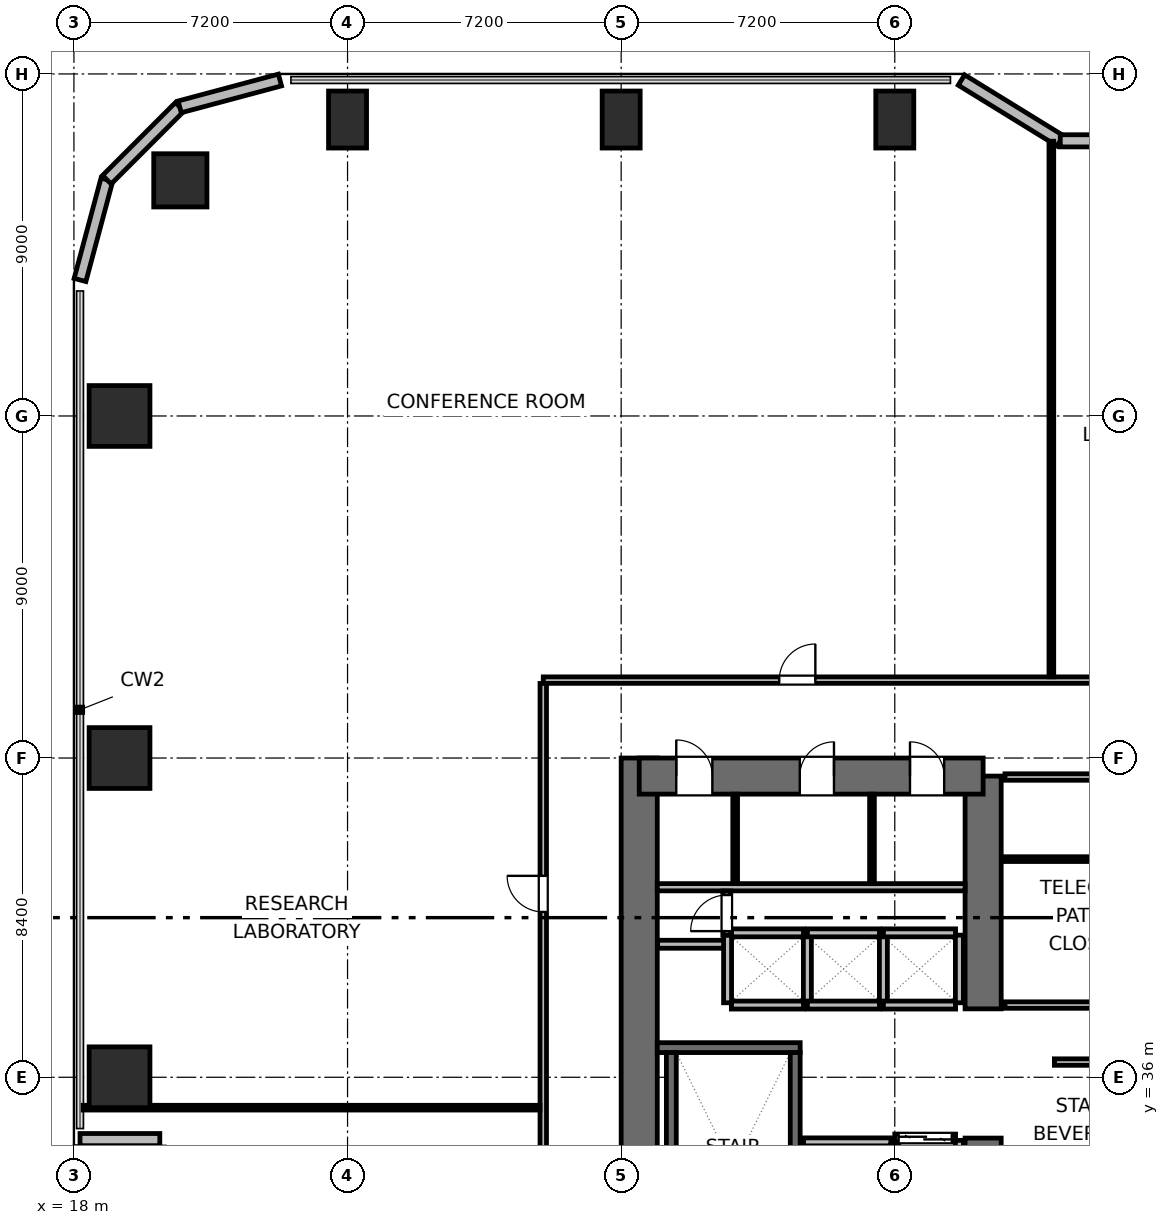
"""IFC4 building model, lengths in metres.
Left out: names, types, materials, properties, quantities, classifications, styles, units other than length and angle.
Written with IfcOpenShell. Run it as: python <this file> out.ifc"""

import sys

from ifc_helpers import new_model, si_unit, direction, frame, frame_2d, origin, origin_2d, place, context, subcontext, project, spatial, rectangle, circle, extrude, element, fill, save


model = new_model("IFC4")
c1 = context("Model", 3, precision=1e-05, world=origin(), true_north=direction((0.0, 1.0)))
c2 = subcontext(c1, "Body", "Model", "MODEL_VIEW")
j1 = project(units=[si_unit("LENGTHUNIT", "METRE"), si_unit("PLANEANGLEUNIT", "RADIAN")], contexts=[c1])
p1 = place(None, origin())
s1 = spatial("IfcSite", under=j1, at=p1, CompositionType="ELEMENT")
p2 = place(p1, origin())
s2 = spatial("IfcBuilding", under=s1, at=p2, CompositionType="ELEMENT")
p3 = place(p2, frame((0.0, 0.0, 21.6)))
s3 = spatial("IfcBuildingStorey", under=s2, at=p3, CompositionType="ELEMENT", Elevation=21.6)
p4 = place(p3, frame((32.875, 27.6, 0.0), z_axis=(0.0, 0.0, 1.0), x_axis=(0.0, 1.0, 0.0)))
e1 = element("IfcWall", 1, at=p4, inside=s3, PredefinedType="SHEAR", context=c2, shape_type="SweptSolid", body=[
    extrude(rectangle(XDim=16.8, YDim=0.95, at=frame_2d((8.4, 0.0))), origin(), (0.0, 0.0, 1.0), 3.9),
])
p5 = place(p3, frame((41.925, 28.075, 0.0), z_axis=(0.0, 0.0, 1.0), x_axis=(0.0, 1.0, 0.0)))
e2 = element("IfcWall", 2, at=p5, inside=s3, PredefinedType="SHEAR", context=c2, shape_type="SweptSolid", body=[
    extrude(rectangle(XDim=6.325, YDim=0.95, at=frame_2d((3.163, 0.0))), origin(), (0.0, 0.0, 1.0), 3.9),
])
p6 = place(p3, frame((41.925, 37.8, 0.0), z_axis=(0.0, 0.0, 1.0), x_axis=(0.0, 1.0, 0.0)))
e3 = element("IfcWall", 3, at=p6, inside=s3, PredefinedType="SHEAR", context=c2, shape_type="SweptSolid", body=[
    extrude(rectangle(XDim=6.125, YDim=0.95, at=frame_2d((3.062, 0.0))), origin(), (0.0, 0.0, 1.0), 3.9),
])
p7 = place(p3, frame((32.875, 43.925, 0.0), z_axis=(0.0, 0.0, 1.0), x_axis=(1.0, 0.0, 0.0)))
e4 = element("IfcWall", 4, at=p7, inside=s3, PredefinedType="SHEAR", context=c2, shape_type="SweptSolid", body=[
    extrude(rectangle(XDim=9.05, YDim=0.95, at=frame_2d((4.525, 0.0))), origin(), (0.0, 0.0, 1.0), 3.9),
])
p8 = place(p7, frame((0.975, 0.0, 0.0)))
e5 = element("IfcOpeningElement", 5, at=p8, cuts=e4, PredefinedType="OPENING", context=c2, shape_type="SweptSolid", body=[
    extrude(rectangle(XDim=0.95, YDim=2.04, at=frame_2d((0.475, 1.02))), frame((0.0, 0.485, 0.0), z_axis=(0.0, -1.0, 0.0), x_axis=(1.0, 0.0, 0.0)), (0.0, 0.0, 1.0), 0.97),
])
p9 = place(p7, frame((4.225, 0.0, 0.0)))
e6 = element("IfcOpeningElement", 6, at=p9, cuts=e4, PredefinedType="OPENING", context=c2, shape_type="SweptSolid", body=[
    extrude(rectangle(XDim=0.9, YDim=2.02, at=frame_2d((0.45, 1.01))), frame((0.0, 0.485, 0.0), z_axis=(0.0, -1.0, 0.0), x_axis=(1.0, 0.0, 0.0)), (0.0, 0.0, 1.0), 0.97),
])
p10 = place(p7, frame((7.125, 0.0, 0.0)))
e7 = element("IfcOpeningElement", 7, at=p10, cuts=e4, PredefinedType="OPENING", context=c2, shape_type="SweptSolid", body=[
    extrude(rectangle(XDim=0.9, YDim=2.02, at=frame_2d((0.45, 1.01))), frame((0.0, 0.485, 0.0), z_axis=(0.0, -1.0, 0.0), x_axis=(1.0, 0.0, 0.0)), (0.0, 0.0, 1.0), 0.97),
])
p11 = place(p3, frame((33.35, 36.78, 0.0), z_axis=(0.0, 0.0, 1.0), x_axis=(1.0, 0.0, 0.0)))
e8 = element("IfcWall", 8, at=p11, inside=s3, PredefinedType="SHEAR", context=c2, shape_type="SweptSolid", body=[
    extrude(rectangle(XDim=3.76, YDim=0.26, at=frame_2d((1.88, 0.0))), origin(), (0.0, 0.0, 1.0), 3.9),
])
p12 = place(p3, frame((33.72, 29.05, 0.0), z_axis=(0.0, 0.0, 1.0), x_axis=(0.0, 1.0, 0.0)))
e9 = element("IfcWall", 9, at=p12, inside=s3, PredefinedType="SHEAR", context=c2, shape_type="SweptSolid", body=[
    extrude(rectangle(XDim=7.6, YDim=0.26, at=frame_2d((3.8, 0.0))), origin(), (0.0, 0.0, 1.0), 3.9),
])
p13 = place(p3, frame((36.98, 29.05, 0.0), z_axis=(0.0, 0.0, 1.0), x_axis=(0.0, 1.0, 0.0)))
e10 = element("IfcWall", 10, at=p13, inside=s3, PredefinedType="SHEAR", context=c2, shape_type="SweptSolid", body=[
    extrude(rectangle(XDim=7.6, YDim=0.26, at=frame_2d((3.8, 0.0))), origin(), (0.0, 0.0, 1.0), 3.9),
])
p14 = place(p13, frame((0.3, 0.0, 0.0)))
e11 = element("IfcOpeningElement", 11, at=p14, cuts=e10, PredefinedType="OPENING", context=c2, shape_type="SweptSolid", body=[
    extrude(rectangle(XDim=1.0, YDim=2.04, at=frame_2d((0.5, 1.02))), frame((0.0, 0.14, 0.0), z_axis=(0.0, -1.0, 0.0), x_axis=(1.0, 0.0, 0.0)), (0.0, 0.0, 1.0), 0.28),
])
p15 = place(p3, frame((20.8, 59.6, 0.0), z_axis=(0.0, 0.0, 1.0), x_axis=(1.0, 0.0, 0.0)))
e12 = element("IfcColumn", 12, at=p15, inside=s3, PredefinedType="COLUMN", context=c2, shape_type="SweptSolid", body=[
    extrude(circle(Radius=0.7, at=origin_2d()), origin(), (0.0, 0.0, 1.0), 3.9),
])
for number, where, z_axis, x_axis in (
    (13, (25.2, 61.2, 0.0), (0.0, 0.0, 1.0), (1.0, 0.0, 0.0)),
    (14, (32.4, 61.2, 0.0), (0.0, 0.0, 1.0), (1.0, 0.0, 0.0)),
    (15, (39.6, 61.2, 0.0), (0.0, 0.0, 1.0), (1.0, 0.0, 0.0)),
):
    element("IfcColumn", number, at=place(p3, frame(where, z_axis=z_axis, x_axis=x_axis)), inside=s3, PredefinedType="COLUMN", context=c2, shape_type="SweptSolid", body=[
        extrude(rectangle(XDim=1.0, YDim=1.5, at=origin_2d()), origin(), (0.0, 0.0, 1.0), 3.9),
    ])
for number, where, z_axis, x_axis in (
    (16, (19.2, 36.0, 0.0), (0.0, 0.0, 1.0), (1.0, 0.0, 0.0)),
    (17, (19.2, 44.4, 0.0), (0.0, 0.0, 1.0), (1.0, 0.0, 0.0)),
    (18, (19.2, 53.4, 0.0), (0.0, 0.0, 1.0), (1.0, 0.0, 0.0)),
):
    element("IfcColumn", number, at=place(p3, frame(where, z_axis=z_axis, x_axis=x_axis)), inside=s3, PredefinedType="COLUMN", context=c2, shape_type="SweptSolid", body=[
        extrude(rectangle(XDim=1.6, YDim=1.6, at=origin_2d()), origin(), (0.0, 0.0, 1.0), 3.9),
    ])
p16 = place(p3, frame((20.26, 34.36, 0.0), z_axis=(0.0, 0.0, 1.0), x_axis=(-1.0, 0.0, 0.0)))
e19 = element("IfcWall", 19, at=p16, inside=s3, PredefinedType="SOLIDWALL", context=c2, shape_type="SweptSolid", body=[
    extrude(rectangle(XDim=2.1, YDim=0.32, at=frame_2d((1.05, 0.0))), origin(), (0.0, 0.0, 1.0), 2.875),
])
p17 = place(p3, frame((18.16, 56.979, 0.0), z_axis=(0.0, 0.0, 1.0), x_axis=(0.25869736047, 0.965958423373, 0.0)))
e20 = element("IfcWall", 20, at=p17, inside=s3, PredefinedType="SOLIDWALL", context=c2, shape_type="SweptSolid", body=[
    extrude(rectangle(XDim=2.731, YDim=0.32, at=frame_2d((1.366, 0.0))), origin(), (0.0, 0.0, 1.0), 3.64),
])
p18 = place(p3, frame((18.866, 59.617, 0.0), z_axis=(0.0, 0.0, 1.0), x_axis=(0.707106781187, 0.707106781187, 0.0)))
e21 = element("IfcWall", 21, at=p18, inside=s3, PredefinedType="SOLIDWALL", context=c2, shape_type="SweptSolid", body=[
    extrude(rectangle(XDim=2.71, YDim=0.32, at=frame_2d((1.355, 0.0))), origin(), (0.0, 0.0, 1.0), 3.64),
])
p19 = place(p3, frame((20.783, 61.533, 0.0), z_axis=(0.0, 0.0, 1.0), x_axis=(0.965964405026, 0.25867502435, 0.0)))
e22 = element("IfcWall", 22, at=p19, inside=s3, PredefinedType="SOLIDWALL", context=c2, shape_type="SweptSolid", body=[
    extrude(rectangle(XDim=2.731, YDim=0.32, at=frame_2d((1.366, 0.0))), origin(), (0.0, 0.0, 1.0), 3.64),
])
p20 = place(p3, frame((41.355, 62.24, 0.0), z_axis=(0.0, 0.0, 1.0), x_axis=(0.851630857047, -0.524142044989, 0.0)))
e23 = element("IfcWall", 23, at=p20, inside=s3, PredefinedType="SOLIDWALL", context=c2, shape_type="SweptSolid", body=[
    extrude(rectangle(XDim=3.053, YDim=0.32, at=frame_2d((1.526, 0.0))), origin(), (0.0, 0.0, 1.0), 2.875),
])
p21 = place(p3, frame((43.955, 60.64, 0.0), z_axis=(0.0, 0.0, 1.0), x_axis=(1.0, 0.0, 0.0)))
e24 = element("IfcWall", 24, at=p21, inside=s3, PredefinedType="SOLIDWALL", context=c2, shape_type="SweptSolid", body=[
    extrude(rectangle(XDim=4.685, YDim=0.32, at=frame_2d((2.343, 0.0))), origin(), (0.0, 0.0, 1.0), 2.875),
])
p22 = place(p21, frame((1.443, 0.0, 0.85)))
e25 = element("IfcOpeningElement", 25, at=p22, cuts=e24, PredefinedType="OPENING", context=c2, shape_type="SweptSolid", body=[
    extrude(rectangle(XDim=1.8, YDim=1.1, at=frame_2d((0.9, 0.55))), frame((0.0, 0.17, 0.0), z_axis=(0.0, -1.0, 0.0), x_axis=(1.0, 0.0, 0.0)), (0.0, 0.0, 1.0), 0.34),
])
p23 = place(p3, frame((33.35, 41.0, 0.0), z_axis=(0.0, 0.0, 1.0), x_axis=(1.0, 0.0, 0.0)))
e26 = element("IfcWall", 26, at=p23, inside=s3, PredefinedType="PLUMBINGWALL", context=c2, shape_type="SweptSolid", body=[
    extrude(rectangle(XDim=8.1, YDim=0.19, at=frame_2d((4.05, 0.0))), origin(), (0.0, 0.0, 1.0), 3.64),
])
for number, where, z_axis, x_axis in (
    (27, (35.4, 41.095, 0.0), (0.0, 0.0, 1.0), (0.0, 1.0, 0.0)),
    (28, (39.0, 41.095, 0.0), (0.0, 0.0, 1.0), (0.0, 1.0, 0.0)),
):
    element("IfcWall", number, at=place(p3, frame(where, z_axis=z_axis, x_axis=x_axis)), inside=s3, PredefinedType="PARTITIONING", context=c2, shape_type="SweptSolid", body=[
        extrude(rectangle(XDim=2.355, YDim=0.125, at=frame_2d((1.177, 0.0))), origin(), (0.0, 0.0, 1.0), 3.64),
    ])
p24 = place(p3, frame((33.36, 39.5, 0.0), z_axis=(0.0, 0.0, 1.0), x_axis=(1.0, 0.0, 0.0)))
e29 = element("IfcWall", 29, at=p24, inside=s3, PredefinedType="PARTITIONING", context=c2, shape_type="SweptSolid", body=[
    extrude(rectangle(XDim=1.86, YDim=0.21, at=frame_2d((0.93, 0.0))), origin(), (0.0, 0.0, 1.0), 3.64),
])
p25 = place(p3, frame((37.2, 34.3, 0.0), z_axis=(0.0, 0.0, 1.0), x_axis=(1.0, 0.0, 0.0)))
e30 = element("IfcWall", 30, at=p25, inside=s3, PredefinedType="PARTITIONING", context=c2, shape_type="SweptSolid", body=[
    extrude(rectangle(XDim=2.3, YDim=0.21, at=frame_2d((1.15, 0.0))), origin(), (0.0, 0.0, 1.0), 3.64),
])
p26 = place(p3, frame((39.6, 31.96, 0.0), z_axis=(0.0, 0.0, 1.0), x_axis=(0.0, 1.0, 0.0)))
e31 = element("IfcWall", 31, at=p26, inside=s3, PredefinedType="PARTITIONING", context=c2, shape_type="SweptSolid", body=[
    extrude(rectangle(XDim=2.28, YDim=0.21, at=frame_2d((1.14, 0.0))), origin(), (0.0, 0.0, 1.0), 3.64),
])
p27 = place(p3, frame((39.6, 34.4, 0.0), z_axis=(0.0, 0.0, 1.0), x_axis=(1.0, 0.0, 0.0)))
e32 = element("IfcWall", 32, at=p27, inside=s3, PredefinedType="PARTITIONING", context=c2, shape_type="SweptSolid", body=[
    extrude(rectangle(XDim=1.6, YDim=0.21, at=frame_2d((0.8, 0.0))), origin(), (0.0, 0.0, 1.0), 3.64),
])
p28 = place(p27, frame((0.1, 0.0, 0.0)))
e33 = element("IfcOpeningElement", 33, at=p28, cuts=e32, PredefinedType="OPENING", context=c2, shape_type="SweptSolid", body=[
    extrude(rectangle(XDim=1.4, YDim=2.06, at=frame_2d((0.7, 1.03))), frame((0.0, 0.115, 0.0), z_axis=(0.0, -1.0, 0.0), x_axis=(1.0, 0.0, 0.0)), (0.0, 0.0, 1.0), 0.23),
])
p29 = place(p3, frame((41.3, 31.96, 0.0), z_axis=(0.0, 0.0, 1.0), x_axis=(0.0, 1.0, 0.0)))
e34 = element("IfcWall", 34, at=p29, inside=s3, PredefinedType="PARTITIONING", context=c2, shape_type="SweptSolid", body=[
    extrude(rectangle(XDim=2.38, YDim=0.21, at=frame_2d((1.19, 0.0))), origin(), (0.0, 0.0, 1.0), 3.64),
])
for number, where, z_axis, x_axis in (
    (35, (35.3, 37.9, 0.0), (0.0, 0.0, 1.0), (1.0, 0.0, 0.0)),
    (36, (35.3, 39.8, 0.0), (0.0, 0.0, 1.0), (1.0, 0.0, 0.0)),
):
    element("IfcWall", number, at=place(p3, frame(where, z_axis=z_axis, x_axis=x_axis)), inside=s3, PredefinedType="PARTITIONING", context=c2, shape_type="SweptSolid", body=[
        extrude(rectangle(XDim=1.9, YDim=0.21, at=frame_2d((0.95, 0.0))), origin(), (0.0, 0.0, 1.0), 3.64),
    ])
for number, where, z_axis, x_axis in (
    (37, (35.2, 37.96, 0.0), (0.0, 0.0, 1.0), (0.0, 1.0, 0.0)),
    (38, (37.3, 37.96, 0.0), (0.0, 0.0, 1.0), (0.0, 1.0, 0.0)),
):
    element("IfcWall", number, at=place(p3, frame(where, z_axis=z_axis, x_axis=x_axis)), inside=s3, PredefinedType="PARTITIONING", context=c2, shape_type="SweptSolid", body=[
        extrude(rectangle(XDim=1.78, YDim=0.21, at=frame_2d((0.89, 0.0))), origin(), (0.0, 0.0, 1.0), 3.64),
    ])
for number, where, z_axis, x_axis in (
    (39, (37.3, 37.9, 0.0), (0.0, 0.0, 1.0), (1.0, 0.0, 0.0)),
    (40, (37.3, 39.8, 0.0), (0.0, 0.0, 1.0), (1.0, 0.0, 0.0)),
):
    element("IfcWall", number, at=place(p3, frame(where, z_axis=z_axis, x_axis=x_axis)), inside=s3, PredefinedType="PARTITIONING", context=c2, shape_type="SweptSolid", body=[
        extrude(rectangle(XDim=1.9, YDim=0.21, at=frame_2d((0.95, 0.0))), origin(), (0.0, 0.0, 1.0), 3.64),
    ])
p30 = place(p3, frame((39.3, 37.96, 0.0), z_axis=(0.0, 0.0, 1.0), x_axis=(0.0, 1.0, 0.0)))
e41 = element("IfcWall", 41, at=p30, inside=s3, PredefinedType="PARTITIONING", context=c2, shape_type="SweptSolid", body=[
    extrude(rectangle(XDim=1.78, YDim=0.21, at=frame_2d((0.89, 0.0))), origin(), (0.0, 0.0, 1.0), 3.64),
])
for number, where, z_axis, x_axis in (
    (42, (39.3, 37.9, 0.0), (0.0, 0.0, 1.0), (1.0, 0.0, 0.0)),
    (43, (39.3, 39.8, 0.0), (0.0, 0.0, 1.0), (1.0, 0.0, 0.0)),
):
    element("IfcWall", number, at=place(p3, frame(where, z_axis=z_axis, x_axis=x_axis)), inside=s3, PredefinedType="PARTITIONING", context=c2, shape_type="SweptSolid", body=[
        extrude(rectangle(XDim=1.9, YDim=0.21, at=frame_2d((0.95, 0.0))), origin(), (0.0, 0.0, 1.0), 3.64),
    ])
p31 = place(p3, frame((41.3, 37.96, 0.0), z_axis=(0.0, 0.0, 1.0), x_axis=(0.0, 1.0, 0.0)))
e44 = element("IfcWall", 44, at=p31, inside=s3, PredefinedType="PARTITIONING", context=c2, shape_type="SweptSolid", body=[
    extrude(rectangle(XDim=1.78, YDim=0.21, at=frame_2d((0.89, 0.0))), origin(), (0.0, 0.0, 1.0), 3.64),
])
p32 = place(p3, frame((35.18, 39.74, 0.0), z_axis=(0.0, 0.0, 1.0), x_axis=(0.0, 1.0, 0.0)))
e45 = element("IfcWall", 45, at=p32, inside=s3, PredefinedType="PARTITIONING", context=c2, shape_type="SweptSolid", body=[
    extrude(rectangle(XDim=1.16, YDim=0.21, at=frame_2d((0.58, 0.0))), origin(), (0.0, 0.0, 1.0), 3.64),
])
p33 = place(p32, frame((0.105, 0.0, 0.0)))
e46 = element("IfcOpeningElement", 46, at=p33, cuts=e45, PredefinedType="OPENING", context=c2, shape_type="SweptSolid", body=[
    extrude(rectangle(XDim=0.95, YDim=2.04, at=frame_2d((0.475, 1.02))), frame((0.0, 0.115, 0.0), z_axis=(0.0, -1.0, 0.0), x_axis=(1.0, 0.0, 0.0)), (0.0, 0.0, 1.0), 0.23),
])
p34 = place(p3, frame((43.8, 36.4, 0.0), z_axis=(0.0, 0.0, 1.0), x_axis=(1.0, 0.0, 0.0)))
e47 = element("IfcWall", 47, at=p34, inside=s3, PredefinedType="PARTITIONING", context=c2, shape_type="SweptSolid", body=[
    extrude(rectangle(XDim=2.913, YDim=0.17, at=frame_2d((1.457, 0.0))), origin(), (0.0, 0.0, 1.0), 3.64),
])
p35 = place(p3, frame((42.5, 37.9, 0.0), z_axis=(0.0, 0.0, 1.0), x_axis=(1.0, 0.0, 0.0)))
e48 = element("IfcWall", 48, at=p35, inside=s3, PredefinedType="PARTITIONING", context=c2, shape_type="SweptSolid", body=[
    extrude(rectangle(XDim=4.213, YDim=0.17, at=frame_2d((2.106, 0.0))), origin(), (0.0, 0.0, 1.0), 3.64),
])
p36 = place(p3, frame((42.5, 43.9, 0.0), z_axis=(0.0, 0.0, 1.0), x_axis=(1.0, 0.0, 0.0)))
e49 = element("IfcWall", 49, at=p36, inside=s3, PredefinedType="PARTITIONING", context=c2, shape_type="SweptSolid", body=[
    extrude(rectangle(XDim=4.213, YDim=0.17, at=frame_2d((2.106, 0.0))), origin(), (0.0, 0.0, 1.0), 2.525),
])
p37 = place(p3, frame((42.5, 41.74, 0.0), z_axis=(0.0, 0.0, 1.0), x_axis=(1.0, 0.0, 0.0)))
e50 = element("IfcWall", 50, at=p37, inside=s3, PredefinedType="PARTITIONING", context=c2, shape_type="SweptSolid", body=[
    extrude(rectangle(XDim=4.213, YDim=0.125, at=frame_2d((2.106, 0.0))), origin(), (0.0, 0.0, 1.0), 3.64),
])
p38 = place(p3, frame((30.35, 46.45, 0.0), z_axis=(0.0, 0.0, 1.0), x_axis=(1.0, 0.0, 0.0)))
e51 = element("IfcWall", 51, at=p38, inside=s3, PredefinedType="PARTITIONING", context=c2, shape_type="SweptSolid", body=[
    extrude(rectangle(XDim=35.3, YDim=0.17, at=frame_2d((17.65, 0.0))), origin(), (0.0, 0.0, 1.0), 3.64),
])
p39 = place(p38, frame((6.21, 0.0, 0.0)))
e52 = element("IfcOpeningElement", 52, at=p39, cuts=e51, PredefinedType="OPENING", context=c2, shape_type="SweptSolid", body=[
    extrude(rectangle(XDim=0.95, YDim=2.04, at=frame_2d((0.475, 1.02))), frame((0.0, 0.095, 0.0), z_axis=(0.0, -1.0, 0.0), x_axis=(1.0, 0.0, 0.0)), (0.0, 0.0, 1.0), 0.19),
])
p40 = place(p38, frame((15.38, 0.0, 0.0)))
e53 = element("IfcOpeningElement", 53, at=p40, cuts=e51, PredefinedType="OPENING", context=c2, shape_type="SweptSolid", body=[
    extrude(rectangle(XDim=0.95, YDim=2.04, at=frame_2d((0.475, 1.02))), frame((0.0, 0.095, 0.0), z_axis=(0.0, -1.0, 0.0), x_axis=(1.0, 0.0, 0.0)), (0.0, 0.0, 1.0), 0.19),
])
p41 = place(p38, frame((26.345, 0.0, 0.0)))
e54 = element("IfcOpeningElement", 54, at=p41, cuts=e51, PredefinedType="OPENING", context=c2, shape_type="SweptSolid", body=[
    extrude(rectangle(XDim=0.95, YDim=2.04, at=frame_2d((0.475, 1.02))), frame((0.0, 0.095, 0.0), z_axis=(0.0, -1.0, 0.0), x_axis=(1.0, 0.0, 0.0)), (0.0, 0.0, 1.0), 0.19),
])
p42 = place(p3, frame((30.35, 25.637, 0.0), z_axis=(0.0, 0.0, 1.0), x_axis=(0.0, 1.0, 0.0)))
e55 = element("IfcWall", 55, at=p42, inside=s3, PredefinedType="PARTITIONING", context=c2, shape_type="SweptSolid", body=[
    extrude(rectangle(XDim=20.726, YDim=0.17, at=frame_2d((10.363, 0.0))), origin(), (0.0, 0.0, 1.0), 3.64),
])
p43 = place(p42, frame((4.263, 0.0, 0.0)))
e56 = element("IfcOpeningElement", 56, at=p43, cuts=e55, PredefinedType="OPENING", context=c2, shape_type="SweptSolid", body=[
    extrude(rectangle(XDim=0.95, YDim=2.04, at=frame_2d((0.475, 1.02))), frame((0.0, 0.095, 0.0), z_axis=(0.0, -1.0, 0.0), x_axis=(1.0, 0.0, 0.0)), (0.0, 0.0, 1.0), 0.19),
])
p44 = place(p42, frame((14.713, 0.0, 0.0)))
e57 = element("IfcOpeningElement", 57, at=p44, cuts=e55, PredefinedType="OPENING", context=c2, shape_type="SweptSolid", body=[
    extrude(rectangle(XDim=0.95, YDim=2.04, at=frame_2d((0.475, 1.02))), frame((0.0, 0.095, 0.0), z_axis=(0.0, -1.0, 0.0), x_axis=(1.0, 0.0, 0.0)), (0.0, 0.0, 1.0), 0.19),
])
p45 = place(p3, frame((43.72, 46.537, 0.0), z_axis=(0.0, 0.0, 1.0), x_axis=(0.0, 1.0, 0.0)))
e58 = element("IfcWall", 58, at=p45, inside=s3, PredefinedType="PARTITIONING", context=c2, shape_type="SweptSolid", body=[
    extrude(rectangle(XDim=14.093, YDim=0.125, at=frame_2d((7.046, 0.0))), origin(), (0.0, 0.0, 1.0), 3.003),
])
p46 = place(p3, frame((18.245, 35.2, 0.0), z_axis=(0.0, 0.0, 1.0), x_axis=(1.0, 0.0, 0.0)))
e59 = element("IfcWall", 59, at=p46, inside=s3, PredefinedType="PARTITIONING", context=c2, shape_type="SweptSolid", body=[
    extrude(rectangle(XDim=12.018, YDim=0.125, at=frame_2d((6.009, 0.0))), origin(), (0.0, 0.0, 1.0), 3.64),
])
p47 = place(p28, origin())
e60 = element("IfcDoor", 60, at=p47, inside=s3, OperationType="DOUBLE_DOOR_SLIDING", PredefinedType="DOOR", context=c2, shape_type="SweptSolid", body=[
    extrude(rectangle(XDim=1.4, YDim=2.06, at=frame_2d((0.7, 1.03))), frame((0.0, 0.025, 0.0), z_axis=(0.0, -1.0, 0.0), x_axis=(1.0, 0.0, 0.0)), (0.0, 0.0, 1.0), 0.05),
])
fill(e33, e60)
p48 = place(p8, origin())
e61 = element("IfcDoor", 61, at=p48, inside=s3, OperationType="SINGLE_SWING_LEFT", PredefinedType="DOOR", context=c2, shape_type="SweptSolid", body=[
    extrude(rectangle(XDim=0.95, YDim=2.04, at=frame_2d((0.475, 1.02))), frame((0.0, 0.025, 0.0), z_axis=(0.0, -1.0, 0.0), x_axis=(1.0, 0.0, 0.0)), (0.0, 0.0, 1.0), 0.05),
])
fill(e5, e61)
p49 = place(p9, origin())
e62 = element("IfcDoor", 62, at=p49, inside=s3, OperationType="SINGLE_SWING_RIGHT", PredefinedType="DOOR", context=c2, shape_type="SweptSolid", body=[
    extrude(rectangle(XDim=0.9, YDim=2.02, at=frame_2d((0.45, 1.01))), frame((0.0, 0.025, 0.0), z_axis=(0.0, -1.0, 0.0), x_axis=(1.0, 0.0, 0.0)), (0.0, 0.0, 1.0), 0.05),
])
fill(e6, e62)
p50 = place(p10, origin())
e63 = element("IfcDoor", 63, at=p50, inside=s3, OperationType="SINGLE_SWING_LEFT", PredefinedType="DOOR", context=c2, shape_type="SweptSolid", body=[
    extrude(rectangle(XDim=0.9, YDim=2.02, at=frame_2d((0.45, 1.01))), frame((0.0, 0.025, 0.0), z_axis=(0.0, -1.0, 0.0), x_axis=(1.0, 0.0, 0.0)), (0.0, 0.0, 1.0), 0.05),
])
fill(e7, e63)
p51 = place(p33, origin())
e64 = element("IfcDoor", 64, at=p51, inside=s3, OperationType="SINGLE_SWING_LEFT", PredefinedType="DOOR", context=c2, shape_type="SweptSolid", body=[
    extrude(rectangle(XDim=0.95, YDim=2.04, at=frame_2d((0.475, 1.02))), frame((0.0, 0.025, 0.0), z_axis=(0.0, -1.0, 0.0), x_axis=(1.0, 0.0, 0.0)), (0.0, 0.0, 1.0), 0.05),
])
fill(e46, e64)
p52 = place(p39, origin())
e65 = element("IfcDoor", 65, at=p52, inside=s3, OperationType="SINGLE_SWING_RIGHT", PredefinedType="DOOR", context=c2, shape_type="SweptSolid", body=[
    extrude(rectangle(XDim=0.95, YDim=2.04, at=frame_2d((0.475, 1.02))), frame((0.0, 0.025, 0.0), z_axis=(0.0, -1.0, 0.0), x_axis=(1.0, 0.0, 0.0)), (0.0, 0.0, 1.0), 0.05),
])
fill(e52, e65)
p53 = place(p44, origin())
e66 = element("IfcDoor", 66, at=p53, inside=s3, OperationType="SINGLE_SWING_RIGHT", PredefinedType="DOOR", context=c2, shape_type="SweptSolid", body=[
    extrude(rectangle(XDim=0.95, YDim=2.04, at=frame_2d((0.475, 1.02))), frame((0.0, 0.025, 0.0), z_axis=(0.0, -1.0, 0.0), x_axis=(1.0, 0.0, 0.0)), (0.0, 0.0, 1.0), 0.05),
])
fill(e57, e66)
save(model, sys.argv[1])
